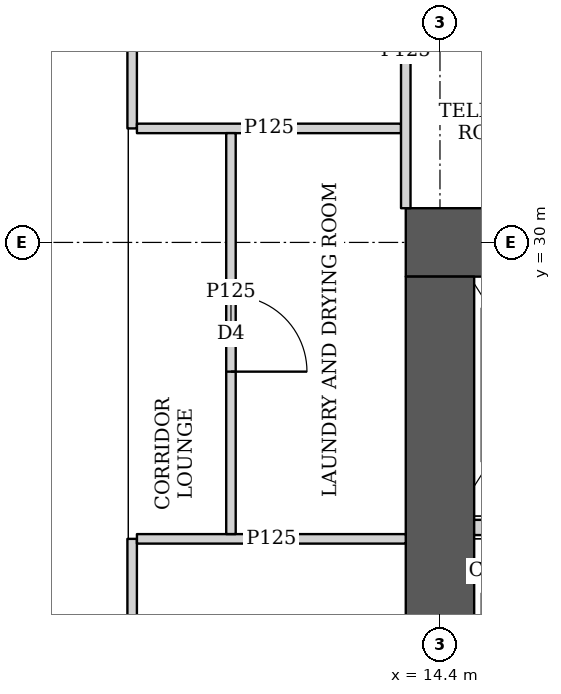
"""IFC4 building model, lengths in metres.
Left out: names, types, materials, properties, quantities, classifications, styles, units other than length and angle.
Written with IfcOpenShell. Run it as: python <this file> out.ifc"""

import sys

from ifc_helpers import new_model, si_unit, direction, frame, frame_2d, origin, place, context, subcontext, project, spatial, rectangle, extrude, element, fill, save


model = new_model("IFC4")
c1 = context("Model", 3, precision=1e-05, world=origin(), true_north=direction((0.0, 1.0)))
c2 = subcontext(c1, "Body", "Model", "MODEL_VIEW")
j1 = project(units=[si_unit("LENGTHUNIT", "METRE"), si_unit("PLANEANGLEUNIT", "RADIAN")], contexts=[c1])
p1 = place(None, origin())
s1 = spatial("IfcSite", under=j1, at=p1, CompositionType="ELEMENT")
p2 = place(p1, origin())
s2 = spatial("IfcBuilding", under=s1, at=p2, CompositionType="ELEMENT")
p3 = place(p2, frame((0.0, 0.0, 23.75)))
s3 = spatial("IfcBuildingStorey", under=s2, at=p3, CompositionType="ELEMENT", Elevation=23.75)
p4 = place(p3, frame((13.95, 30.0, 0.0), z_axis=(0.0, 0.0, 1.0), x_axis=(1.0, 0.0, 0.0)))
e1 = element("IfcWall", 1, at=p4, inside=s3, PredefinedType="SHEAR", context=c2, shape_type="SweptSolid", body=[
    extrude(rectangle(XDim=15.3, YDim=0.9, at=frame_2d((7.65, 0.0))), origin(), (0.0, 0.0, 1.0), 3.75),
])
p5 = place(p4, frame((4.45, 0.0, 0.0)))
e2 = element("IfcOpeningElement", 2, at=p5, cuts=e1, PredefinedType="OPENING", context=c2, shape_type="SweptSolid", body=[
    extrude(rectangle(XDim=1.8, YDim=2.1, at=frame_2d((0.9, 1.05))), frame((0.0, 0.46, 0.0), z_axis=(0.0, -1.0, 0.0), x_axis=(1.0, 0.0, 0.0)), (0.0, 0.0, 1.0), 0.92),
])
p6 = place(p4, frame((10.7, 0.0, 0.0)))
e3 = element("IfcOpeningElement", 3, at=p6, cuts=e1, PredefinedType="OPENING", context=c2, shape_type="SweptSolid", body=[
    extrude(rectangle(XDim=1.1, YDim=2.1, at=frame_2d((0.55, 1.05))), frame((0.0, 0.46, 0.0), z_axis=(0.0, -1.0, 0.0), x_axis=(1.0, 0.0, 0.0)), (0.0, 0.0, 1.0), 0.92),
])
p7 = place(p3, frame((14.4, 15.45, 0.0), z_axis=(0.0, 0.0, 1.0), x_axis=(0.0, 1.0, 0.0)))
e4 = element("IfcWall", 4, at=p7, inside=s3, PredefinedType="SHEAR", context=c2, shape_type="SweptSolid", body=[
    extrude(rectangle(XDim=14.1, YDim=0.9, at=frame_2d((7.05, 0.0))), origin(), (0.0, 0.0, 1.0), 3.75),
])
p8 = place(p3, frame((10.35, 10.3, 0.0), z_axis=(0.0, 0.0, 1.0), x_axis=(0.0, 1.0, 0.0)))
e5 = element("IfcWall", 5, at=p8, inside=s3, PredefinedType="PARTITIONING", context=c2, shape_type="SweptSolid", body=[
    extrude(rectangle(XDim=15.8, YDim=0.125, at=frame_2d((7.9, 0.0))), origin(), (0.0, 0.0, 1.0), 3.5),
])
p9 = place(p8, frame((1.55, 0.0, 0.0)))
e6 = element("IfcOpeningElement", 6, at=p9, cuts=e5, PredefinedType="OPENING", context=c2, shape_type="SweptSolid", body=[
    extrude(rectangle(XDim=1.0, YDim=2.1, at=frame_2d((0.5, 1.05))), frame((0.0, 0.073, 0.0), z_axis=(0.0, -1.0, 0.0), x_axis=(1.0, 0.0, 0.0)), (0.0, 0.0, 1.0), 0.145),
])
p10 = place(p8, frame((5.7, 0.0, 0.0)))
e7 = element("IfcOpeningElement", 7, at=p10, cuts=e5, PredefinedType="OPENING", context=c2, shape_type="SweptSolid", body=[
    extrude(rectangle(XDim=1.0, YDim=2.1, at=frame_2d((0.5, 1.05))), frame((0.0, 0.073, 0.0), z_axis=(0.0, -1.0, 0.0), x_axis=(1.0, 0.0, 0.0)), (0.0, 0.0, 1.0), 0.145),
])
p11 = place(p8, frame((11.55, 0.0, 0.0)))
e8 = element("IfcOpeningElement", 8, at=p11, cuts=e5, PredefinedType="OPENING", context=c2, shape_type="SweptSolid", body=[
    extrude(rectangle(XDim=1.0, YDim=2.1, at=frame_2d((0.5, 1.05))), frame((0.0, 0.073, 0.0), z_axis=(0.0, -1.0, 0.0), x_axis=(1.0, 0.0, 0.0)), (0.0, 0.0, 1.0), 0.145),
])
p12 = place(p3, frame((10.35, 31.5, 0.0), z_axis=(0.0, 0.0, 1.0), x_axis=(0.0, 1.0, 0.0)))
e9 = element("IfcWall", 9, at=p12, inside=s3, PredefinedType="PARTITIONING", context=c2, shape_type="SweptSolid", body=[
    extrude(rectangle(XDim=3.2, YDim=0.125, at=frame_2d((1.6, 0.0))), origin(), (0.0, 0.0, 1.0), 3.5),
])
p13 = place(p12, frame((1.1, 0.0, 0.0)))
e10 = element("IfcOpeningElement", 10, at=p13, cuts=e9, PredefinedType="OPENING", context=c2, shape_type="SweptSolid", body=[
    extrude(rectangle(XDim=1.0, YDim=2.1, at=frame_2d((0.5, 1.05))), frame((0.0, 0.073, 0.0), z_axis=(0.0, -1.0, 0.0), x_axis=(1.0, 0.0, 0.0)), (0.0, 0.0, 1.0), 0.145),
])
p14 = place(p3, frame((11.65, 26.163, 0.0), z_axis=(0.0, 0.0, 1.0), x_axis=(0.0, 1.0, 0.0)))
e11 = element("IfcWall", 11, at=p14, inside=s3, PredefinedType="PARTITIONING", context=c2, shape_type="SweptSolid", body=[
    extrude(rectangle(XDim=5.275, YDim=0.125, at=frame_2d((2.637, 0.0))), origin(), (0.0, 0.0, 1.0), 3.5),
])
p15 = place(p14, frame((2.137, 0.0, 0.0)))
e12 = element("IfcOpeningElement", 12, at=p15, cuts=e11, PredefinedType="OPENING", context=c2, shape_type="SweptSolid", body=[
    extrude(rectangle(XDim=1.0, YDim=2.1, at=frame_2d((0.5, 1.05))), frame((0.0, 0.073, 0.0), z_axis=(0.0, -1.0, 0.0), x_axis=(1.0, 0.0, 0.0)), (0.0, 0.0, 1.0), 0.145),
])
p16 = place(p3, frame((10.413, 26.1, 0.0), z_axis=(0.0, 0.0, 1.0), x_axis=(1.0, 0.0, 0.0)))
e13 = element("IfcWall", 13, at=p16, inside=s3, PredefinedType="PARTITIONING", context=c2, shape_type="SweptSolid", body=[
    extrude(rectangle(XDim=3.537, YDim=0.125, at=frame_2d((1.769, 0.0))), origin(), (0.0, 0.0, 1.0), 3.5),
])
p17 = place(p3, frame((10.413, 31.5, 0.0), z_axis=(0.0, 0.0, 1.0), x_axis=(1.0, 0.0, 0.0)))
e14 = element("IfcWall", 14, at=p17, inside=s3, PredefinedType="PARTITIONING", context=c2, shape_type="SweptSolid", body=[
    extrude(rectangle(XDim=3.475, YDim=0.125, at=frame_2d((1.737, 0.0))), origin(), (0.0, 0.0, 1.0), 3.5),
])
p18 = place(p3, frame((13.95, 30.45, 0.0), z_axis=(0.0, 0.0, 1.0), x_axis=(0.0, 1.0, 0.0)))
e15 = element("IfcWall", 15, at=p18, inside=s3, PredefinedType="PARTITIONING", context=c2, shape_type="SweptSolid", body=[
    extrude(rectangle(XDim=4.137, YDim=0.125, at=frame_2d((2.068, 0.0))), origin(), (0.0, 0.0, 1.0), 3.5),
])
p19 = place(p3, frame((14.85, 26.25, 0.0), z_axis=(0.0, 0.0, 1.0), x_axis=(1.0, 0.0, 0.0)))
e16 = element("IfcWall", 16, at=p19, inside=s3, PredefinedType="SOLIDWALL", context=c2, shape_type="SweptSolid", body=[
    extrude(rectangle(XDim=1.95, YDim=0.2, at=frame_2d((0.975, 0.0))), origin(), (0.0, 0.0, 1.0), 3.5),
])
p20 = place(p15, origin())
e17 = element("IfcDoor", 17, at=p20, inside=s3, OperationType="SINGLE_SWING_RIGHT", PredefinedType="DOOR", context=c2, shape_type="SweptSolid", body=[
    extrude(rectangle(XDim=1.0, YDim=2.1, at=frame_2d((0.5, 1.05))), frame((0.0, 0.025, 0.0), z_axis=(0.0, -1.0, 0.0), x_axis=(1.0, 0.0, 0.0)), (0.0, 0.0, 1.0), 0.05),
])
fill(e12, e17)
save(model, sys.argv[1])
